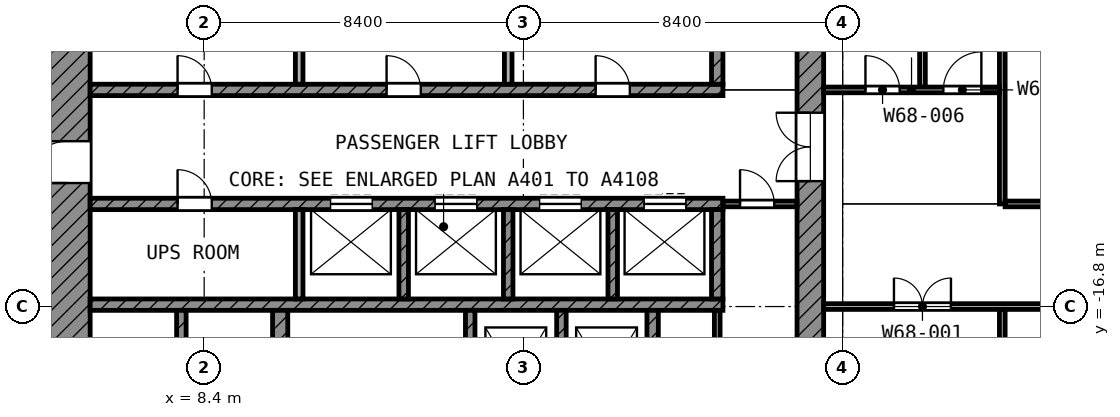
"""IFC4 building model, lengths in metres.
Left out: names, types, materials, properties, quantities, classifications, styles, units other than length and angle.
Written with IfcOpenShell. Run it as: python <this file> out.ifc"""

import sys

from ifc_helpers import new_model, si_unit, direction, frame, frame_2d, origin, place, context, subcontext, project, spatial, rectangle, extrude, element, fill, save


model = new_model("IFC4")
c1 = context("Model", 3, precision=1e-05, world=origin(), true_north=direction((0.0, 1.0)))
c2 = subcontext(c1, "Body", "Model", "MODEL_VIEW")
j1 = project(units=[si_unit("LENGTHUNIT", "METRE"), si_unit("PLANEANGLEUNIT", "RADIAN")], contexts=[c1])
p1 = place(None, origin())
s1 = spatial("IfcSite", under=j1, at=p1, CompositionType="ELEMENT")
p2 = place(p1, origin())
s2 = spatial("IfcBuilding", under=s1, at=p2, CompositionType="ELEMENT")
p3 = place(p2, frame((0.0, 0.0, 294.4)))
s3 = spatial("IfcBuildingStorey", under=s2, at=p3, CompositionType="ELEMENT", Elevation=294.4)
p4 = place(p3, frame((4.8, -24.7, 0.0), z_axis=(0.0, 0.0, 1.0), x_axis=(0.0, 1.0, 0.0)))
e1 = element("IfcWall", 1, at=p4, inside=s3, PredefinedType="SHEAR", context=c2, shape_type="SweptSolid", body=[
    extrude(rectangle(XDim=19.3, YDim=1.2, at=frame_2d((9.65, 0.0))), origin(), (0.0, 0.0, 1.0), 3.6),
])
p5 = place(p4, frame((11.15, 0.0, 0.0)))
e2 = element("IfcOpeningElement", 2, at=p5, cuts=e1, PredefinedType="OPENING", context=c2, shape_type="SweptSolid", body=[
    extrude(rectangle(XDim=1.1, YDim=2.1, at=frame_2d((0.55, 1.05))), frame((0.0, 0.61, 0.0), z_axis=(0.0, -1.0, 0.0), x_axis=(1.0, 0.0, 0.0)), (0.0, 0.0, 1.0), 1.22),
])
p6 = place(p4, frame((1.85, 0.0, 0.0)))
e3 = element("IfcOpeningElement", 3, at=p6, cuts=e1, PredefinedType="OPENING", context=c2, shape_type="SweptSolid", body=[
    extrude(rectangle(XDim=1.1, YDim=2.1, at=frame_2d((0.55, 1.05))), frame((0.0, 0.61, 0.0), z_axis=(0.0, -1.0, 0.0), x_axis=(1.0, 0.0, 0.0)), (0.0, 0.0, 1.0), 1.22),
])
p7 = place(p3, frame((24.35, -24.0, 0.0), z_axis=(0.0, 0.0, 1.0), x_axis=(0.0, 1.0, 0.0)))
e4 = element("IfcWall", 4, at=p7, inside=s3, PredefinedType="SHEAR", context=c2, shape_type="SweptSolid", body=[
    extrude(rectangle(XDim=18.6, YDim=0.7, at=frame_2d((9.3, 0.0))), origin(), (0.0, 0.0, 1.0), 3.6),
])
p8 = place(p7, frame((10.5, 0.0, 0.0)))
e5 = element("IfcOpeningElement", 5, at=p8, cuts=e4, PredefinedType="OPENING", context=c2, shape_type="SweptSolid", body=[
    extrude(rectangle(XDim=1.8, YDim=2.1, at=frame_2d((0.9, 1.05))), frame((0.0, 0.36, 0.0), z_axis=(0.0, -1.0, 0.0), x_axis=(1.0, 0.0, 0.0)), (0.0, 0.0, 1.0), 0.72),
])
p9 = place(p3, frame((5.4, -11.1, 0.0), z_axis=(0.0, 0.0, 1.0), x_axis=(1.0, 0.0, 0.0)))
e6 = element("IfcWall", 6, at=p9, inside=s3, PredefinedType="SHEAR", context=c2, shape_type="SweptSolid", body=[
    extrude(rectangle(XDim=16.65, YDim=0.3, at=frame_2d((8.325, 0.0))), origin(), (0.0, 0.0, 1.0), 3.6),
])
p10 = place(p9, frame((2.3, 0.0, 0.0)))
e7 = element("IfcOpeningElement", 7, at=p10, cuts=e6, PredefinedType="OPENING", context=c2, shape_type="SweptSolid", body=[
    extrude(rectangle(XDim=0.9, YDim=2.1, at=frame_2d((0.45, 1.05))), frame((0.0, 0.16, 0.0), z_axis=(0.0, -1.0, 0.0), x_axis=(1.0, 0.0, 0.0)), (0.0, 0.0, 1.0), 0.32),
])
p11 = place(p9, frame((7.8, 0.0, 0.0)))
e8 = element("IfcOpeningElement", 8, at=p11, cuts=e6, PredefinedType="OPENING", context=c2, shape_type="SweptSolid", body=[
    extrude(rectangle(XDim=0.9, YDim=2.1, at=frame_2d((0.45, 1.05))), frame((0.0, 0.16, 0.0), z_axis=(0.0, -1.0, 0.0), x_axis=(1.0, 0.0, 0.0)), (0.0, 0.0, 1.0), 0.32),
])
p12 = place(p9, frame((13.3, 0.0, 0.0)))
e9 = element("IfcOpeningElement", 9, at=p12, cuts=e6, PredefinedType="OPENING", context=c2, shape_type="SweptSolid", body=[
    extrude(rectangle(XDim=0.9, YDim=2.1, at=frame_2d((0.45, 1.05))), frame((0.0, 0.16, 0.0), z_axis=(0.0, -1.0, 0.0), x_axis=(1.0, 0.0, 0.0)), (0.0, 0.0, 1.0), 0.32),
])
p13 = place(p3, frame((5.4, -14.1, 0.0), z_axis=(0.0, 0.0, 1.0), x_axis=(1.0, 0.0, 0.0)))
e10 = element("IfcWall", 10, at=p13, inside=s3, PredefinedType="SHEAR", context=c2, shape_type="SweptSolid", body=[
    extrude(rectangle(XDim=16.65, YDim=0.3, at=frame_2d((8.325, 0.0))), origin(), (0.0, 0.0, 1.0), 3.6),
])
p14 = place(p13, frame((6.325, 0.0, 0.0)))
e11 = element("IfcOpeningElement", 11, at=p14, cuts=e10, PredefinedType="OPENING", context=c2, shape_type="SweptSolid", body=[
    extrude(rectangle(XDim=1.1, YDim=2.1, at=frame_2d((0.55, 1.05))), frame((0.0, 0.16, 0.0), z_axis=(0.0, -1.0, 0.0), x_axis=(1.0, 0.0, 0.0)), (0.0, 0.0, 1.0), 0.32),
])
p15 = place(p13, frame((9.075, 0.0, 0.0)))
e12 = element("IfcOpeningElement", 12, at=p15, cuts=e10, PredefinedType="OPENING", context=c2, shape_type="SweptSolid", body=[
    extrude(rectangle(XDim=1.1, YDim=2.1, at=frame_2d((0.55, 1.05))), frame((0.0, 0.16, 0.0), z_axis=(0.0, -1.0, 0.0), x_axis=(1.0, 0.0, 0.0)), (0.0, 0.0, 1.0), 0.32),
])
p16 = place(p13, frame((11.825, 0.0, 0.0)))
e13 = element("IfcOpeningElement", 13, at=p16, cuts=e10, PredefinedType="OPENING", context=c2, shape_type="SweptSolid", body=[
    extrude(rectangle(XDim=1.1, YDim=2.1, at=frame_2d((0.55, 1.05))), frame((0.0, 0.16, 0.0), z_axis=(0.0, -1.0, 0.0), x_axis=(1.0, 0.0, 0.0)), (0.0, 0.0, 1.0), 0.32),
])
p17 = place(p13, frame((14.575, 0.0, 0.0)))
e14 = element("IfcOpeningElement", 14, at=p17, cuts=e10, PredefinedType="OPENING", context=c2, shape_type="SweptSolid", body=[
    extrude(rectangle(XDim=1.1, YDim=2.1, at=frame_2d((0.55, 1.05))), frame((0.0, 0.16, 0.0), z_axis=(0.0, -1.0, 0.0), x_axis=(1.0, 0.0, 0.0)), (0.0, 0.0, 1.0), 0.32),
])
p18 = place(p13, frame((2.3, 0.0, 0.0)))
e15 = element("IfcOpeningElement", 15, at=p18, cuts=e10, PredefinedType="OPENING", context=c2, shape_type="SweptSolid", body=[
    extrude(rectangle(XDim=0.9, YDim=2.1, at=frame_2d((0.45, 1.05))), frame((0.0, 0.16, 0.0), z_axis=(0.0, -1.0, 0.0), x_axis=(1.0, 0.0, 0.0)), (0.0, 0.0, 1.0), 0.32),
])
p19 = place(p3, frame((5.4, -16.75, 0.0), z_axis=(0.0, 0.0, 1.0), x_axis=(1.0, 0.0, 0.0)))
e16 = element("IfcWall", 16, at=p19, inside=s3, PredefinedType="SHEAR", context=c2, shape_type="SweptSolid", body=[
    extrude(rectangle(XDim=16.65, YDim=0.3, at=frame_2d((8.325, 0.0))), origin(), (0.0, 0.0, 1.0), 3.6),
])
p20 = place(p3, frame((10.4, -20.05, 0.0), z_axis=(0.0, 0.0, 1.0), x_axis=(0.0, 1.0, 0.0)))
e17 = element("IfcWall", 17, at=p20, inside=s3, PredefinedType="SHEAR", context=c2, shape_type="SweptSolid", body=[
    extrude(rectangle(XDim=3.15, YDim=0.4, at=frame_2d((1.575, 0.0))), origin(), (0.0, 0.0, 1.0), 3.6),
])
p21 = place(p3, frame((20.2, -20.35, 0.0), z_axis=(0.0, 0.0, 1.0), x_axis=(0.0, 1.0, 0.0)))
e18 = element("IfcWall", 18, at=p21, inside=s3, PredefinedType="SHEAR", context=c2, shape_type="SweptSolid", body=[
    extrude(rectangle(XDim=3.45, YDim=0.3, at=frame_2d((1.725, 0.0))), origin(), (0.0, 0.0, 1.0), 3.6),
])
p22 = place(p3, frame((21.9, -10.95, 0.0), z_axis=(0.0, 0.0, 1.0), x_axis=(0.0, 1.0, 0.0)))
e19 = element("IfcWall", 19, at=p22, inside=s3, PredefinedType="SHEAR", context=c2, shape_type="SweptSolid", body=[
    extrude(rectangle(XDim=2.35, YDim=0.3, at=frame_2d((1.175, 0.0))), origin(), (0.0, 0.0, 1.0), 3.6),
])
p23 = place(p3, frame((21.9, -16.6, 0.0), z_axis=(0.0, 0.0, 1.0), x_axis=(0.0, 1.0, 0.0)))
e20 = element("IfcWall", 20, at=p23, inside=s3, PredefinedType="SHEAR", context=c2, shape_type="SweptSolid", body=[
    extrude(rectangle(XDim=2.35, YDim=0.3, at=frame_2d((1.175, 0.0))), origin(), (0.0, 0.0, 1.0), 3.6),
])
for number, where, z_axis, x_axis in (
    (21, (7.8, -20.05, 0.0), (0.0, 0.0, 1.0), (0.0, 1.0, 0.0)),
    (22, (15.4, -20.05, 0.0), (0.0, 0.0, 1.0), (0.0, 1.0, 0.0)),
    (23, (17.8, -20.05, 0.0), (0.0, 0.0, 1.0), (0.0, 1.0, 0.0)),
):
    element("IfcWall", number, at=place(p3, frame(where, z_axis=z_axis, x_axis=x_axis)), inside=s3, PredefinedType="SHEAR", context=c2, shape_type="SweptSolid", body=[
        extrude(rectangle(XDim=3.15, YDim=0.25, at=frame_2d((1.575, 0.0))), origin(), (0.0, 0.0, 1.0), 3.6),
    ])
for number, where, z_axis, x_axis in (
    (24, (10.9, -10.95, 0.0), (0.0, 0.0, 1.0), (0.0, 1.0, 0.0)),
    (25, (16.4, -10.95, 0.0), (0.0, 0.0, 1.0), (0.0, 1.0, 0.0)),
):
    element("IfcWall", number, at=place(p3, frame(where, z_axis=z_axis, x_axis=x_axis)), inside=s3, PredefinedType="PARTITIONING", context=c2, shape_type="SweptSolid", body=[
        extrude(rectangle(XDim=2.35, YDim=0.2, at=frame_2d((1.175, 0.0))), origin(), (0.0, 0.0, 1.0), 3.6),
    ])
p24 = place(p3, frame((10.9, -16.6, 0.0), z_axis=(0.0, 0.0, 1.0), x_axis=(0.0, 1.0, 0.0)))
e26 = element("IfcWall", 26, at=p24, inside=s3, PredefinedType="PARTITIONING", context=c2, shape_type="SweptSolid", body=[
    extrude(rectangle(XDim=2.35, YDim=0.2, at=frame_2d((1.175, 0.0))), origin(), (0.0, 0.0, 1.0), 3.6),
])
for number, where, z_axis, x_axis in (
    (27, (13.65, -16.6, 0.0), (0.0, 0.0, 1.0), (0.0, 1.0, 0.0)),
    (28, (16.4, -16.6, 0.0), (0.0, 0.0, 1.0), (0.0, 1.0, 0.0)),
    (29, (19.15, -16.6, 0.0), (0.0, 0.0, 1.0), (0.0, 1.0, 0.0)),
):
    element("IfcWall", number, at=place(p3, frame(where, z_axis=z_axis, x_axis=x_axis)), inside=s3, PredefinedType="SHEAR", context=c2, shape_type="SweptSolid", body=[
        extrude(rectangle(XDim=2.35, YDim=0.25, at=frame_2d((1.175, 0.0))), origin(), (0.0, 0.0, 1.0), 3.6),
    ])
p25 = place(p3, frame((21.9, -19.05, 0.0), z_axis=(0.0, 0.0, 1.0), x_axis=(0.0, 1.0, 0.0)))
e30 = element("IfcWall", 30, at=p25, inside=s3, PredefinedType="PARTITIONING", context=c2, shape_type="SweptSolid", body=[
    extrude(rectangle(XDim=2.15, YDim=0.15, at=frame_2d((1.075, 0.0))), origin(), (0.0, 0.0, 1.0), 3.6),
])
p26 = place(p3, frame((22.05, -14.1, 0.0), z_axis=(0.0, 0.0, 1.0), x_axis=(1.0, 0.0, 0.0)))
e31 = element("IfcWall", 31, at=p26, inside=s3, PredefinedType="PARTITIONING", context=c2, shape_type="SweptSolid", body=[
    extrude(rectangle(XDim=1.95, YDim=0.15, at=frame_2d((0.975, 0.0))), origin(), (0.0, 0.0, 1.0), 3.6),
])
p27 = place(p26, frame((0.45, 0.0, 0.0)))
e32 = element("IfcOpeningElement", 32, at=p27, cuts=e31, PredefinedType="OPENING", context=c2, shape_type="SweptSolid", body=[
    extrude(rectangle(XDim=0.9, YDim=2.1, at=frame_2d((0.45, 1.05))), frame((0.0, 0.085, 0.0), z_axis=(0.0, -1.0, 0.0), x_axis=(1.0, 0.0, 0.0)), (0.0, 0.0, 1.0), 0.17),
])
p28 = place(p3, frame((24.7, -16.8, 0.0), z_axis=(0.0, 0.0, 1.0), x_axis=(1.0, 0.0, 0.0)))
e33 = element("IfcWall", 33, at=p28, inside=s3, PredefinedType="PARTITIONING", context=c2, shape_type="SweptSolid", body=[
    extrude(rectangle(XDim=34.02, YDim=0.15, at=frame_2d((17.01, 0.0))), origin(), (0.0, 0.0, 1.0), 3.6),
])
p29 = place(p28, frame((1.85, 0.0, 0.0)))
e34 = element("IfcOpeningElement", 34, at=p29, cuts=e33, PredefinedType="OPENING", context=c2, shape_type="SweptSolid", body=[
    extrude(rectangle(XDim=1.5, YDim=2.1, at=frame_2d((0.75, 1.05))), frame((0.0, 0.085, 0.0), z_axis=(0.0, -1.0, 0.0), x_axis=(1.0, 0.0, 0.0)), (0.0, 0.0, 1.0), 0.17),
])
p30 = place(p28, frame((9.4, 0.0, 0.0)))
e35 = element("IfcOpeningElement", 35, at=p30, cuts=e33, PredefinedType="OPENING", context=c2, shape_type="SweptSolid", body=[
    extrude(rectangle(XDim=1.2, YDim=2.1, at=frame_2d((0.6, 1.05))), frame((0.0, 0.085, 0.0), z_axis=(0.0, -1.0, 0.0), x_axis=(1.0, 0.0, 0.0)), (0.0, 0.0, 1.0), 0.17),
])
p31 = place(p28, frame((19.8, 0.0, 0.0)))
e36 = element("IfcOpeningElement", 36, at=p31, cuts=e33, PredefinedType="OPENING", context=c2, shape_type="SweptSolid", body=[
    extrude(rectangle(XDim=1.2, YDim=2.1, at=frame_2d((0.6, 1.05))), frame((0.0, 0.085, 0.0), z_axis=(0.0, -1.0, 0.0), x_axis=(1.0, 0.0, 0.0)), (0.0, 0.0, 1.0), 0.17),
])
p32 = place(p28, frame((18.28, 0.0, 0.0)))
e37 = element("IfcOpeningElement", 37, at=p32, cuts=e33, PredefinedType="OPENING", context=c2, shape_type="SweptSolid", body=[
    extrude(rectangle(XDim=1.2, YDim=2.1, at=frame_2d((0.6, 1.05))), frame((0.0, 0.085, 0.0), z_axis=(0.0, -1.0, 0.0), x_axis=(1.0, 0.0, 0.0)), (0.0, 0.0, 1.0), 0.17),
])
p33 = place(p28, frame((24.0, 0.0, 0.0)))
e38 = element("IfcOpeningElement", 38, at=p33, cuts=e33, PredefinedType="OPENING", context=c2, shape_type="SweptSolid", body=[
    extrude(rectangle(XDim=1.2, YDim=2.1, at=frame_2d((0.6, 1.05))), frame((0.0, 0.085, 0.0), z_axis=(0.0, -1.0, 0.0), x_axis=(1.0, 0.0, 0.0)), (0.0, 0.0, 1.0), 0.17),
])
p34 = place(p28, frame((27.45, 0.0, 0.0)))
e39 = element("IfcOpeningElement", 39, at=p34, cuts=e33, PredefinedType="OPENING", context=c2, shape_type="SweptSolid", body=[
    extrude(rectangle(XDim=1.0, YDim=2.1, at=frame_2d((0.5, 1.05))), frame((0.0, 0.085, 0.0), z_axis=(0.0, -1.0, 0.0), x_axis=(1.0, 0.0, 0.0)), (0.0, 0.0, 1.0), 0.17),
])
p35 = place(p28, frame((31.65, 0.0, 0.0)))
e40 = element("IfcOpeningElement", 40, at=p35, cuts=e33, PredefinedType="OPENING", context=c2, shape_type="SweptSolid", body=[
    extrude(rectangle(XDim=1.0, YDim=2.1, at=frame_2d((0.5, 1.05))), frame((0.0, 0.085, 0.0), z_axis=(0.0, -1.0, 0.0), x_axis=(1.0, 0.0, 0.0)), (0.0, 0.0, 1.0), 0.17),
])
p36 = place(p3, frame((29.475, -14.1, 0.0), z_axis=(0.0, 0.0, 1.0), x_axis=(1.0, 0.0, 0.0)))
e41 = element("IfcWall", 41, at=p36, inside=s3, PredefinedType="PARTITIONING", context=c2, shape_type="SweptSolid", body=[
    extrude(rectangle(XDim=10.807, YDim=0.15, at=frame_2d((5.403, 0.0))), origin(), (0.0, 0.0, 1.0), 3.6),
])
p37 = place(p36, frame((1.425, 0.0, 0.0)))
e42 = element("IfcOpeningElement", 42, at=p37, cuts=e41, PredefinedType="OPENING", context=c2, shape_type="SweptSolid", body=[
    extrude(rectangle(XDim=1.2, YDim=2.1, at=frame_2d((0.6, 1.05))), frame((0.0, 0.085, 0.0), z_axis=(0.0, -1.0, 0.0), x_axis=(1.0, 0.0, 0.0)), (0.0, 0.0, 1.0), 0.17),
])
p38 = place(p3, frame((24.7, -11.1, 0.0), z_axis=(0.0, 0.0, 1.0), x_axis=(1.0, 0.0, 0.0)))
e43 = element("IfcWall", 43, at=p38, inside=s3, PredefinedType="PARTITIONING", context=c2, shape_type="SweptSolid", body=[
    extrude(rectangle(XDim=4.625, YDim=0.15, at=frame_2d((2.312, 0.0))), origin(), (0.0, 0.0, 1.0), 3.6),
])
p39 = place(p38, frame((1.1, 0.0, 0.0)))
e44 = element("IfcOpeningElement", 44, at=p39, cuts=e43, PredefinedType="OPENING", context=c2, shape_type="SweptSolid", body=[
    extrude(rectangle(XDim=0.9, YDim=2.1, at=frame_2d((0.45, 1.05))), frame((0.0, 0.085, 0.0), z_axis=(0.0, -1.0, 0.0), x_axis=(1.0, 0.0, 0.0)), (0.0, 0.0, 1.0), 0.17),
])
p40 = place(p38, frame((3.15, 0.0, 0.0)))
e45 = element("IfcOpeningElement", 45, at=p40, cuts=e43, PredefinedType="OPENING", context=c2, shape_type="SweptSolid", body=[
    extrude(rectangle(XDim=1.0, YDim=2.1, at=frame_2d((0.5, 1.05))), frame((0.0, 0.085, 0.0), z_axis=(0.0, -1.0, 0.0), x_axis=(1.0, 0.0, 0.0)), (0.0, 0.0, 1.0), 0.17),
])
p41 = place(p3, frame((27.3, -11.025, 0.0), z_axis=(0.0, 0.0, 1.0), x_axis=(0.0, 1.0, 0.0)))
e46 = element("IfcWall", 46, at=p41, inside=s3, PredefinedType="PARTITIONING", context=c2, shape_type="SweptSolid", body=[
    extrude(rectangle(XDim=10.945, YDim=0.15, at=frame_2d((5.472, 0.0))), origin(), (0.0, 0.0, 1.0), 3.6),
])
p42 = place(p3, frame((29.4, -31.198, 0.0), z_axis=(0.0, 0.0, 1.0), x_axis=(0.0, 1.0, 0.0)))
e47 = element("IfcWall", 47, at=p42, inside=s3, PredefinedType="PARTITIONING", context=c2, shape_type="SweptSolid", body=[
    extrude(rectangle(XDim=14.323, YDim=0.15, at=frame_2d((7.162, 0.0))), origin(), (0.0, 0.0, 1.0), 3.6),
])
p43 = place(p3, frame((29.4, -14.1, 0.0), z_axis=(0.0, 0.0, 1.0), x_axis=(0.0, 1.0, 0.0)))
e48 = element("IfcWall", 48, at=p43, inside=s3, PredefinedType="PARTITIONING", context=c2, shape_type="SweptSolid", body=[
    extrude(rectangle(XDim=14.02, YDim=0.15, at=frame_2d((7.01, 0.0))), origin(), (0.0, 0.0, 1.0), 3.6),
])
p44 = place(p14, origin())
e49 = element("IfcDoor", 49, at=p44, inside=s3, OperationType="DOUBLE_DOOR_SLIDING", PredefinedType="DOOR", context=c2, shape_type="SweptSolid", body=[
    extrude(rectangle(XDim=1.1, YDim=2.1, at=frame_2d((0.55, 1.05))), frame((0.0, 0.025, 0.0), z_axis=(0.0, -1.0, 0.0), x_axis=(1.0, 0.0, 0.0)), (0.0, 0.0, 1.0), 0.05),
])
fill(e11, e49)
p45 = place(p15, origin())
e50 = element("IfcDoor", 50, at=p45, inside=s3, OperationType="DOUBLE_DOOR_SLIDING", PredefinedType="DOOR", context=c2, shape_type="SweptSolid", body=[
    extrude(rectangle(XDim=1.1, YDim=2.1, at=frame_2d((0.55, 1.05))), frame((0.0, 0.025, 0.0), z_axis=(0.0, -1.0, 0.0), x_axis=(1.0, 0.0, 0.0)), (0.0, 0.0, 1.0), 0.05),
])
fill(e12, e50)
p46 = place(p16, origin())
e51 = element("IfcDoor", 51, at=p46, inside=s3, OperationType="DOUBLE_DOOR_SLIDING", PredefinedType="DOOR", context=c2, shape_type="SweptSolid", body=[
    extrude(rectangle(XDim=1.1, YDim=2.1, at=frame_2d((0.55, 1.05))), frame((0.0, 0.025, 0.0), z_axis=(0.0, -1.0, 0.0), x_axis=(1.0, 0.0, 0.0)), (0.0, 0.0, 1.0), 0.05),
])
fill(e13, e51)
p47 = place(p17, origin())
e52 = element("IfcDoor", 52, at=p47, inside=s3, OperationType="DOUBLE_DOOR_SLIDING", PredefinedType="DOOR", context=c2, shape_type="SweptSolid", body=[
    extrude(rectangle(XDim=1.1, YDim=2.1, at=frame_2d((0.55, 1.05))), frame((0.0, 0.025, 0.0), z_axis=(0.0, -1.0, 0.0), x_axis=(1.0, 0.0, 0.0)), (0.0, 0.0, 1.0), 0.05),
])
fill(e14, e52)
p48 = place(p5, origin())
e53 = element("IfcDoor", 53, at=p48, inside=s3, OperationType="SINGLE_SWING_LEFT", PredefinedType="DOOR", context=c2, shape_type="SweptSolid", body=[
    extrude(rectangle(XDim=1.1, YDim=2.1, at=frame_2d((0.55, 1.05))), frame((0.0, 0.025, 0.0), z_axis=(0.0, -1.0, 0.0), x_axis=(1.0, 0.0, 0.0)), (0.0, 0.0, 1.0), 0.05),
])
fill(e2, e53)
p49 = place(p8, origin())
e54 = element("IfcDoor", 54, at=p49, inside=s3, OperationType="DOUBLE_DOOR_SINGLE_SWING", PredefinedType="DOOR", context=c2, shape_type="SweptSolid", body=[
    extrude(rectangle(XDim=1.8, YDim=2.1, at=frame_2d((0.9, 1.05))), frame((0.0, 0.025, 0.0), z_axis=(0.0, -1.0, 0.0), x_axis=(1.0, 0.0, 0.0)), (0.0, 0.0, 1.0), 0.05),
])
fill(e5, e54)
p50 = place(p27, origin())
e55 = element("IfcDoor", 55, at=p50, inside=s3, OperationType="SINGLE_SWING_LEFT", PredefinedType="DOOR", context=c2, shape_type="SweptSolid", body=[
    extrude(rectangle(XDim=0.9, YDim=2.1, at=frame_2d((0.45, 1.05))), frame((0.0, 0.025, 0.0), z_axis=(0.0, -1.0, 0.0), x_axis=(1.0, 0.0, 0.0)), (0.0, 0.0, 1.0), 0.05),
])
fill(e32, e55)
p51 = place(p10, origin())
e56 = element("IfcDoor", 56, at=p51, inside=s3, OperationType="SINGLE_SWING_LEFT", PredefinedType="DOOR", context=c2, shape_type="SweptSolid", body=[
    extrude(rectangle(XDim=0.9, YDim=2.1, at=frame_2d((0.45, 1.05))), frame((0.0, 0.025, 0.0), z_axis=(0.0, -1.0, 0.0), x_axis=(1.0, 0.0, 0.0)), (0.0, 0.0, 1.0), 0.05),
])
fill(e7, e56)
p52 = place(p11, origin())
e57 = element("IfcDoor", 57, at=p52, inside=s3, OperationType="SINGLE_SWING_LEFT", PredefinedType="DOOR", context=c2, shape_type="SweptSolid", body=[
    extrude(rectangle(XDim=0.9, YDim=2.1, at=frame_2d((0.45, 1.05))), frame((0.0, 0.025, 0.0), z_axis=(0.0, -1.0, 0.0), x_axis=(1.0, 0.0, 0.0)), (0.0, 0.0, 1.0), 0.05),
])
fill(e8, e57)
p53 = place(p12, origin())
e58 = element("IfcDoor", 58, at=p53, inside=s3, OperationType="SINGLE_SWING_LEFT", PredefinedType="DOOR", context=c2, shape_type="SweptSolid", body=[
    extrude(rectangle(XDim=0.9, YDim=2.1, at=frame_2d((0.45, 1.05))), frame((0.0, 0.025, 0.0), z_axis=(0.0, -1.0, 0.0), x_axis=(1.0, 0.0, 0.0)), (0.0, 0.0, 1.0), 0.05),
])
fill(e9, e58)
p54 = place(p18, origin())
e59 = element("IfcDoor", 59, at=p54, inside=s3, OperationType="SINGLE_SWING_LEFT", PredefinedType="DOOR", context=c2, shape_type="SweptSolid", body=[
    extrude(rectangle(XDim=0.9, YDim=2.1, at=frame_2d((0.45, 1.05))), frame((0.0, 0.025, 0.0), z_axis=(0.0, -1.0, 0.0), x_axis=(1.0, 0.0, 0.0)), (0.0, 0.0, 1.0), 0.05),
])
fill(e15, e59)
p55 = place(p29, origin())
e60 = element("IfcDoor", 60, at=p55, inside=s3, OperationType="DOUBLE_DOOR_SINGLE_SWING", PredefinedType="DOOR", context=c2, shape_type="SweptSolid", body=[
    extrude(rectangle(XDim=1.5, YDim=2.1, at=frame_2d((0.75, 1.05))), frame((0.0, 0.025, 0.0), z_axis=(0.0, -1.0, 0.0), x_axis=(1.0, 0.0, 0.0)), (0.0, 0.0, 1.0), 0.05),
])
fill(e34, e60)
p56 = place(p39, origin())
e61 = element("IfcDoor", 61, at=p56, inside=s3, OperationType="SINGLE_SWING_LEFT", PredefinedType="DOOR", context=c2, shape_type="SweptSolid", body=[
    extrude(rectangle(XDim=0.9, YDim=2.1, at=frame_2d((0.45, 1.05))), frame((0.0, 0.025, 0.0), z_axis=(0.0, -1.0, 0.0), x_axis=(1.0, 0.0, 0.0)), (0.0, 0.0, 1.0), 0.05),
])
fill(e44, e61)
p57 = place(p40, origin())
e62 = element("IfcDoor", 62, at=p57, inside=s3, OperationType="SINGLE_SWING_RIGHT", PredefinedType="DOOR", context=c2, shape_type="SweptSolid", body=[
    extrude(rectangle(XDim=1.0, YDim=2.1, at=frame_2d((0.5, 1.05))), frame((0.0, 0.025, 0.0), z_axis=(0.0, -1.0, 0.0), x_axis=(1.0, 0.0, 0.0)), (0.0, 0.0, 1.0), 0.05),
])
fill(e45, e62)
save(model, sys.argv[1])
